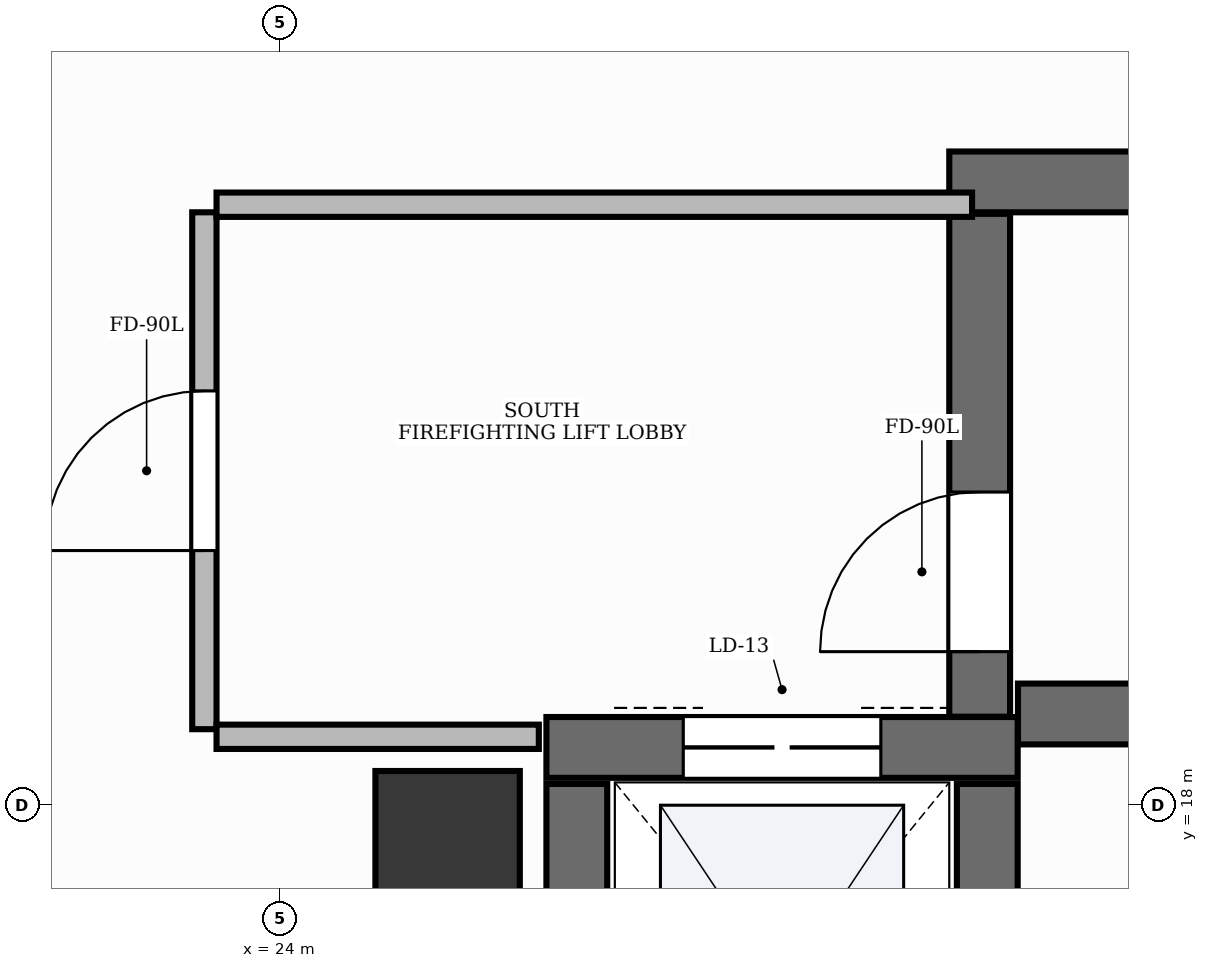
"""IFC4 building model, lengths in metres.
Left out: names, types, materials, properties, quantities, classifications, styles, units other than length and angle.
Written with IfcOpenShell. Run it as: python <this file> out.ifc"""

import sys

from ifc_helpers import new_model, si_unit, direction, frame, frame_2d, origin, origin_2d, place, context, subcontext, project, spatial, rectangle, extrude, element, fill, save


model = new_model("IFC4")
c1 = context("Model", 3, precision=1e-05, world=origin(), true_north=direction((0.0, 1.0)))
c2 = subcontext(c1, "Body", "Model", "MODEL_VIEW")
j1 = project(units=[si_unit("LENGTHUNIT", "METRE"), si_unit("PLANEANGLEUNIT", "RADIAN")], contexts=[c1])
p1 = place(None, origin())
s1 = spatial("IfcSite", under=j1, at=p1, CompositionType="ELEMENT")
p2 = place(p1, origin())
s2 = spatial("IfcBuilding", under=s1, at=p2, CompositionType="ELEMENT")
p3 = place(p2, frame((0.0, 0.0, 166.8)))
s3 = spatial("IfcBuildingStorey", under=s2, at=p3, CompositionType="ELEMENT", Elevation=166.8)
p4 = place(p3, frame((28.852, 18.6, 0.0), z_axis=(0.0, 0.0, 1.0), x_axis=(1.0, 0.0, 0.0)))
e1 = element("IfcWall", 1, at=p4, inside=s3, PredefinedType="SHEAR", context=c2, shape_type="SweptSolid", body=[
    extrude(rectangle(XDim=8.198, YDim=0.4, at=frame_2d((4.099, 0.0))), origin(), (0.0, 0.0, 1.0), 3.9),
])
p5 = place(p3, frame((28.4, 22.1, 0.0), z_axis=(0.0, 0.0, 1.0), x_axis=(1.0, 0.0, 0.0)))
e2 = element("IfcWall", 2, at=p5, inside=s3, PredefinedType="SHEAR", context=c2, shape_type="SweptSolid", body=[
    extrude(rectangle(XDim=8.65, YDim=0.4, at=frame_2d((4.325, 0.0))), origin(), (0.0, 0.0, 1.0), 3.9),
])
p6 = place(p3, frame((28.6, 18.582, 0.0), z_axis=(0.0, 0.0, 1.0), x_axis=(0.0, 1.0, 0.0)))
e3 = element("IfcWall", 3, at=p6, inside=s3, PredefinedType="SHEAR", context=c2, shape_type="SweptSolid", body=[
    extrude(rectangle(XDim=3.308, YDim=0.4, at=frame_2d((1.654, 0.0))), origin(), (0.0, 0.0, 1.0), 3.9),
])
p7 = place(p6, frame((0.428, 0.0, 0.0)))
e4 = element("IfcOpeningElement", 4, at=p7, cuts=e3, PredefinedType="OPENING", context=c2, shape_type="SweptSolid", body=[
    extrude(rectangle(XDim=1.05, YDim=2.15, at=frame_2d((0.525, 1.075))), frame((0.0, 0.215, 0.0), z_axis=(0.0, -1.0, 0.0), x_axis=(1.0, 0.0, 0.0)), (0.0, 0.0, 1.0), 0.43),
])
p8 = place(p3, frame((25.75, 18.38, 0.0), z_axis=(0.0, 0.0, 1.0), x_axis=(1.0, 0.0, 0.0)))
e5 = element("IfcWall", 5, at=p8, inside=s3, PredefinedType="SHEAR", context=c2, shape_type="SweptSolid", body=[
    extrude(rectangle(XDim=3.1, YDim=0.4, at=frame_2d((1.55, 0.0))), origin(), (0.0, 0.0, 1.0), 3.9),
])
p9 = place(p8, frame((0.9, 0.0, 0.0)))
e6 = element("IfcOpeningElement", 6, at=p9, cuts=e5, PredefinedType="OPENING", context=c2, shape_type="SweptSolid", body=[
    extrude(rectangle(XDim=1.3, YDim=2.2, at=frame_2d((0.65, 1.1))), frame((0.0, 0.215, 0.0), z_axis=(0.0, -1.0, 0.0), x_axis=(1.0, 0.0, 0.0)), (0.0, 0.0, 1.0), 0.43),
])
for number, where, z_axis, x_axis in (
    (7, (25.95, 15.44, 0.0), (0.0, 0.0, 1.0), (0.0, 1.0, 0.0)),
    (8, (28.65, 15.44, 0.0), (0.0, 0.0, 1.0), (0.0, 1.0, 0.0)),
):
    element("IfcWall", number, at=place(p3, frame(where, z_axis=z_axis, x_axis=x_axis)), inside=s3, PredefinedType="SHEAR", context=c2, shape_type="SweptSolid", body=[
        extrude(rectangle(XDim=2.7, YDim=0.4, at=frame_2d((1.35, 0.0))), origin(), (0.0, 0.0, 1.0), 3.9),
    ])
p10 = place(p3, frame((25.1, 17.75, -0.0), z_axis=(0.0, 0.0, 1.0), x_axis=(1.0, 0.0, 0.0)))
e9 = element("IfcColumn", 9, at=p10, inside=s3, PredefinedType="PILASTER", context=c2, shape_type="SweptSolid", body=[
    extrude(rectangle(XDim=0.95, YDim=0.95, at=origin_2d()), origin(), (0.0, 0.0, 1.0), 3.901),
])
p11 = place(p3, frame((23.5, 18.5, 0.0), z_axis=(0.0, 0.0, 1.0), x_axis=(0.0, 1.0, 0.0)))
e10 = element("IfcWall", 10, at=p11, inside=s3, PredefinedType="PARTITIONING", context=c2, shape_type="SweptSolid", body=[
    extrude(rectangle(XDim=3.4, YDim=0.16, at=frame_2d((1.7, 0.0))), origin(), (0.0, 0.0, 1.0), 2.91),
])
p12 = place(p11, frame((1.175, 0.0, 0.0)))
e11 = element("IfcOpeningElement", 11, at=p12, cuts=e10, PredefinedType="OPENING", context=c2, shape_type="SweptSolid", body=[
    extrude(rectangle(XDim=1.05, YDim=2.15, at=frame_2d((0.525, 1.075))), frame((0.0, 0.095, 0.0), z_axis=(0.0, -1.0, 0.0), x_axis=(1.0, 0.0, 0.0)), (0.0, 0.0, 1.0), 0.19),
])
p13 = place(p3, frame((23.58, 21.95, 0.0), z_axis=(0.0, 0.0, 1.0), x_axis=(1.0, 0.0, 0.0)))
e12 = element("IfcWall", 12, at=p13, inside=s3, PredefinedType="PARTITIONING", context=c2, shape_type="SweptSolid", body=[
    extrude(rectangle(XDim=4.97, YDim=0.16, at=frame_2d((2.485, 0.0))), origin(), (0.0, 0.0, 1.0), 2.91),
])
p14 = place(p3, frame((23.58, 18.45, 0.0), z_axis=(0.0, 0.0, 1.0), x_axis=(1.0, 0.0, 0.0)))
e13 = element("IfcWall", 13, at=p14, inside=s3, PredefinedType="PARTITIONING", context=c2, shape_type="SweptSolid", body=[
    extrude(rectangle(XDim=2.12, YDim=0.16, at=frame_2d((1.06, 0.0))), origin(), (0.0, 0.0, 1.0), 2.91),
])
p15 = place(p7, origin())
e14 = element("IfcDoor", 14, at=p15, inside=s3, OperationType="SINGLE_SWING_LEFT", PredefinedType="DOOR", context=c2, shape_type="SweptSolid", body=[
    extrude(rectangle(XDim=1.05, YDim=2.15, at=frame_2d((0.525, 1.075))), frame((0.0, 0.025, 0.0), z_axis=(0.0, -1.0, 0.0), x_axis=(1.0, 0.0, 0.0)), (0.0, 0.0, 1.0), 0.05),
])
fill(e4, e14)
p16 = place(p9, origin())
e15 = element("IfcDoor", 15, at=p16, inside=s3, OperationType="DOUBLE_DOOR_SLIDING", PredefinedType="DOOR", context=c2, shape_type="SweptSolid", body=[
    extrude(rectangle(XDim=1.3, YDim=2.2, at=frame_2d((0.65, 1.1))), frame((0.0, 0.025, 0.0), z_axis=(0.0, -1.0, 0.0), x_axis=(1.0, 0.0, 0.0)), (0.0, 0.0, 1.0), 0.05),
])
fill(e6, e15)
p17 = place(p12, origin())
e16 = element("IfcDoor", 16, at=p17, inside=s3, OperationType="SINGLE_SWING_LEFT", PredefinedType="DOOR", context=c2, shape_type="SweptSolid", body=[
    extrude(rectangle(XDim=1.05, YDim=2.15, at=frame_2d((0.525, 1.075))), frame((0.0, 0.025, 0.0), z_axis=(0.0, -1.0, 0.0), x_axis=(1.0, 0.0, 0.0)), (0.0, 0.0, 1.0), 0.05),
])
fill(e11, e16)
save(model, sys.argv[1])
